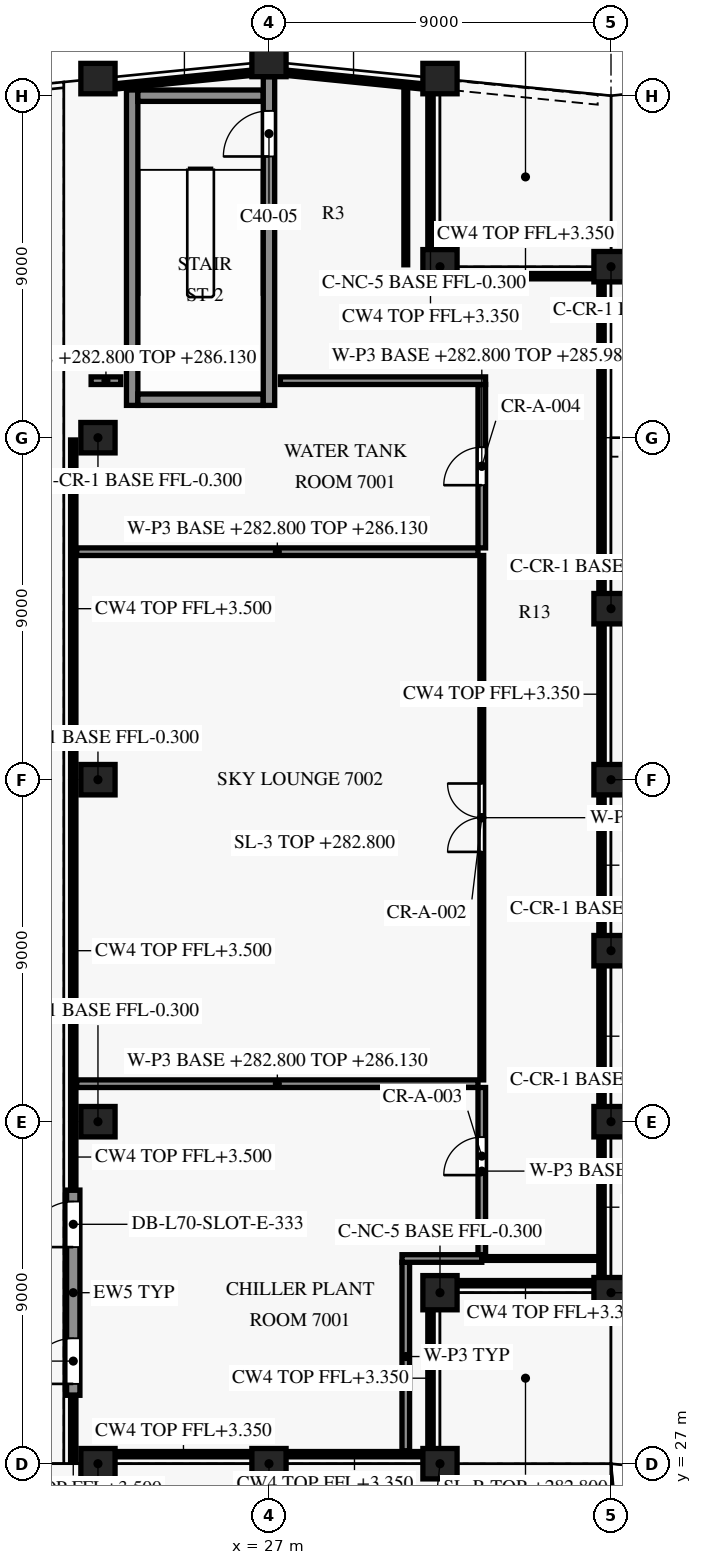
"""IFC4 building model, lengths in metres.
Left out: names, types, materials, properties, quantities, classifications, styles, units other than length and angle.
Written with IfcOpenShell. Run it as: python <this file> out.ifc"""

import sys

from ifc_helpers import new_model, si_unit, direction, frame, frame_2d, origin, origin_2d, place, context, subcontext, project, spatial, polyline, rectangle, outline, extrude, element, fill, save


model = new_model("IFC4")
c1 = context("Model", 3, precision=1e-05, world=origin(), true_north=direction((0.0, 1.0)))
c2 = subcontext(c1, "Body", "Model", "MODEL_VIEW")
j1 = project(units=[si_unit("LENGTHUNIT", "METRE"), si_unit("PLANEANGLEUNIT", "RADIAN")], contexts=[c1])
p1 = place(None, origin())
s1 = spatial("IfcSite", under=j1, at=p1, CompositionType="ELEMENT")
p2 = place(p1, origin())
s2 = spatial("IfcBuilding", under=s1, at=p2, CompositionType="ELEMENT")
p3 = place(p2, frame((0.0, 0.0, 282.8)))
s3 = spatial("IfcBuildingStorey", under=s2, at=p3, CompositionType="ELEMENT", Elevation=282.8)
for number, where, z_axis, x_axis in (
    (1, (36.0, 31.5, -0.3), (0.0, 0.0, 1.0), (0.0, 1.0, 0.0)),
    (2, (36.0, 36.0, -0.3), (0.0, 0.0, 1.0), (0.0, 1.0, 0.0)),
    (3, (36.0, 40.5, -0.3), (0.0, 0.0, 1.0), (0.0, 1.0, 0.0)),
    (4, (36.0, 45.0, -0.3), (0.0, 0.0, 1.0), (0.0, 1.0, 0.0)),
    (5, (36.0, 49.5, -0.3), (0.0, 0.0, 1.0), (0.0, 1.0, 0.0)),
    (6, (36.0, 58.5, -0.3), (0.0, 0.0, 1.0), (0.0, 1.0, 0.0)),
):
    element("IfcColumn", number, at=place(p3, frame(where, z_axis=z_axis, x_axis=x_axis)), inside=s3, PredefinedType="COLUMN", context=c2, shape_type="SweptSolid", body=[
        extrude(rectangle(XDim=0.9, YDim=0.8, at=origin_2d()), origin(), (0.0, 0.0, 1.0), 4.3),
    ])
for number, where, z_axis, x_axis in (
    (7, (31.5, 63.45, 0.0), (0.0, 0.0, 1.0), (-0.995, 0.1, 0.0)),
    (8, (27.0, 63.9, 0.0), (0.0, 0.0, 1.0), (-1.0, 0.0, 0.0)),
    (9, (22.5, 63.45, 0.0), (0.0, 0.0, 1.0), (-0.995, -0.1, 0.0)),
):
    element("IfcColumn", number, at=place(p3, frame(where, z_axis=z_axis, x_axis=x_axis)), inside=s3, PredefinedType="COLUMN", context=c2, shape_type="SweptSolid", body=[
        extrude(rectangle(XDim=0.9, YDim=0.8, at=origin_2d()), origin(), (0.0, 0.0, 1.0), 4.0),
    ])
for number, where, z_axis, x_axis in (
    (10, (22.5, 54.0, -0.3), (0.0, 0.0, 1.0), (1.0, 0.0, 0.0)),
    (11, (22.5, 45.0, -0.3), (0.0, 0.0, 1.0), (1.0, 0.0, 0.0)),
    (12, (22.5, 36.0, -0.3), (0.0, 0.0, 1.0), (1.0, 0.0, 0.0)),
):
    element("IfcColumn", number, at=place(p3, frame(where, z_axis=z_axis, x_axis=x_axis)), inside=s3, PredefinedType="COLUMN", context=c2, shape_type="SweptSolid", body=[
        extrude(rectangle(XDim=0.9, YDim=0.8, at=origin_2d()), origin(), (0.0, 0.0, 1.0), 4.3),
    ])
for number, where, z_axis, x_axis in (
    (13, (31.5, 31.5, -0.3), (0.0, 0.0, 1.0), (1.0, 0.0, 0.0)),
    (14, (31.5, 58.5, -0.3), (0.0, 0.0, 1.0), (1.0, 0.0, 0.0)),
):
    element("IfcColumn", number, at=place(p3, frame(where, z_axis=z_axis, x_axis=x_axis)), inside=s3, PredefinedType="COLUMN", context=c2, shape_type="SweptSolid", body=[
        extrude(rectangle(XDim=0.9, YDim=0.9, at=origin_2d()), origin(), (0.0, 0.0, 1.0), 4.3),
    ])
for number, where, z_axis, x_axis in (
    (15, (22.5, 27.0, -0.3), (0.0, 0.0, 1.0), (1.0, 0.0, 0.0)),
    (16, (27.0, 27.0, -0.3), (0.0, 0.0, 1.0), (1.0, 0.0, 0.0)),
    (17, (31.5, 27.0, -0.3), (0.0, 0.0, 1.0), (1.0, 0.0, 0.0)),
):
    element("IfcColumn", number, at=place(p3, frame(where, z_axis=z_axis, x_axis=x_axis)), inside=s3, PredefinedType="COLUMN", context=c2, shape_type="SweptSolid", body=[
        extrude(rectangle(XDim=0.9, YDim=0.8, at=origin_2d()), origin(), (0.0, 0.0, 1.0), 4.3),
    ])
p4 = place(p3, frame((21.85, 28.8, 0.0), z_axis=(0.0, 0.0, 1.0), x_axis=(0.0, 1.0, 0.0)))
e18 = element("IfcWall", 18, at=p4, inside=s3, PredefinedType="SOLIDWALL", context=c2, shape_type="SweptSolid", body=[
    extrude(rectangle(XDim=5.4, YDim=0.35, at=frame_2d((2.7, 0.0))), origin(), (0.0, 0.0, 1.0), 3.5),
])
p5 = place(p4, frame((0.3, 0.0, 0.0)))
e19 = element("IfcOpeningElement", 19, at=p5, cuts=e18, PredefinedType="OPENING", context=c2, shape_type="SweptSolid", body=[
    extrude(rectangle(XDim=1.2, YDim=2.5, at=frame_2d((0.6, 1.25))), frame((0.0, 0.185, 0.0), z_axis=(0.0, -1.0, 0.0), x_axis=(1.0, 0.0, 0.0)), (0.0, 0.0, 1.0), 0.37),
])
p6 = place(p4, frame((3.9, 0.0, 0.0)))
e20 = element("IfcOpeningElement", 20, at=p6, cuts=e18, PredefinedType="OPENING", context=c2, shape_type="SweptSolid", body=[
    extrude(rectangle(XDim=1.2, YDim=2.5, at=frame_2d((0.6, 1.25))), frame((0.0, 0.185, 0.0), z_axis=(0.0, -1.0, 0.0), x_axis=(1.0, 0.0, 0.0)), (0.0, 0.0, 1.0), 0.37),
])
p7 = place(p3, origin())
e21 = element("IfcWall", 21, at=p7, inside=s3, PredefinedType="PARAPET", context=c2, shape_type="SweptSolid", body=[
    extrude(outline(polyline([(36.05, 53.75), (44.05, 53.75), (44.05, 53.95), (36.05, 53.95), (36.05, 53.75)])), origin(), (0.0, 0.0, 1.0), 1.1),
])
p8 = place(p3, origin())
e22 = element("IfcWall", 22, at=p8, inside=s3, PredefinedType="PARAPET", context=c2, shape_type="SweptSolid", body=[
    extrude(outline(polyline([(44.15, 57.85), (36.05, 57.85), (36.05, 57.65), (43.95, 57.65), (43.95, 53.85), (44.15, 53.85), (44.15, 57.85)])), origin(), (0.0, 0.0, 1.0), 1.1),
])
p9 = place(p3, origin())
e23 = element("IfcWall", 23, at=p9, inside=s3, PredefinedType="PARAPET", context=c2, shape_type="SweptSolid", body=[
    extrude(outline(polyline([(4.52, 18.02), (31.48, 18.02), (31.48, 22.52), (35.65, 22.52), (35.65, 22.77), (31.23, 22.77), (31.23, 18.27), (4.77, 18.27), (4.77, 22.77), (-0.152, 22.77), (0.236, 26.65), (-0.015, 26.65), (-0.428, 22.52), (4.52, 22.52), (4.52, 18.02)])), origin(), (0.0, 0.0, 1.0), 1.4),
])
p10 = place(p3, origin())
e24 = element("IfcWall", 24, at=p10, inside=s3, PredefinedType="PARAPET", context=c2, shape_type="SweptSolid", body=[
    extrude(outline(polyline([(35.65, 63.015), (31.85, 63.395), (31.85, 63.144), (35.65, 62.764), (35.65, 63.015)])), origin(), (0.0, 0.0, 1.0), 1.4),
])
for number, where, z_axis, x_axis in (
    (25, (23.55, 55.0, 0.0), (0.0, 0.0, 1.0), (1.0, 0.0, 0.0)),
    (26, (23.55, 63.0, 0.0), (0.0, 0.0, 1.0), (1.0, 0.0, 0.0)),
):
    element("IfcWall", number, at=place(p3, frame(where, z_axis=z_axis, x_axis=x_axis)), inside=s3, PredefinedType="SHEAR", context=c2, shape_type="SweptSolid", body=[
        extrude(rectangle(XDim=3.3, YDim=0.3, at=frame_2d((1.65, 0.0))), origin(), (0.0, 0.0, 1.0), 3.7),
    ])
p11 = place(p3, frame((23.4, 54.85, 0.0), z_axis=(0.0, 0.0, 1.0), x_axis=(0.0, 1.0, 0.0)))
e27 = element("IfcWall", 27, at=p11, inside=s3, PredefinedType="SHEAR", context=c2, shape_type="SweptSolid", body=[
    extrude(rectangle(XDim=8.3, YDim=0.3, at=frame_2d((4.15, 0.0))), origin(), (0.0, 0.0, 1.0), 3.7),
])
p12 = place(p3, frame((27.0, 54.85, 0.0), z_axis=(0.0, 0.0, 1.0), x_axis=(0.0, 1.0, 0.0)))
e28 = element("IfcWall", 28, at=p12, inside=s3, PredefinedType="SHEAR", context=c2, shape_type="SweptSolid", body=[
    extrude(rectangle(XDim=8.65, YDim=0.3, at=frame_2d((4.325, 0.0))), origin(), (0.0, 0.0, 1.0), 3.7),
])
p13 = place(p12, frame((6.55, 0.0, 0.0)))
e29 = element("IfcOpeningElement", 29, at=p13, cuts=e28, PredefinedType="OPENING", context=c2, shape_type="SweptSolid", body=[
    extrude(rectangle(XDim=1.2, YDim=2.2, at=frame_2d((0.6, 1.1))), frame((0.0, 0.16, 0.0), z_axis=(0.0, -1.0, 0.0), x_axis=(1.0, 0.0, 0.0)), (0.0, 0.0, 1.0), 0.32),
])
p14 = place(p3, frame((30.6, 32.3, 0.0), z_axis=(0.0, 0.0, 1.0), x_axis=(0.0, -1.0, 0.0)))
e30 = element("IfcWall", 30, at=p14, inside=s3, PredefinedType="PARTITIONING", context=c2, shape_type="SweptSolid", body=[
    extrude(rectangle(XDim=4.96, YDim=0.2, at=frame_2d((2.48, 0.0))), origin(), (0.0, 0.0, 1.0), 3.68),
])
p15 = place(p3, frame((32.6, 32.4, 0.0), z_axis=(0.0, 0.0, 1.0), x_axis=(-1.0, 0.0, 0.0)))
e31 = element("IfcWall", 31, at=p15, inside=s3, PredefinedType="PARTITIONING", context=c2, shape_type="SweptSolid", body=[
    extrude(rectangle(XDim=2.1, YDim=0.2, at=frame_2d((1.05, 0.0))), origin(), (0.0, 0.0, 1.0), 3.68),
])
p16 = place(p3, frame((35.66, 32.4, 0.0), z_axis=(0.0, 0.0, 1.0), x_axis=(-1.0, 0.0, 0.0)))
e32 = element("IfcWall", 32, at=p16, inside=s3, PredefinedType="PARTITIONING", context=c2, shape_type="SweptSolid", body=[
    extrude(rectangle(XDim=3.06, YDim=0.1, at=frame_2d((1.53, 0.0))), origin(), (0.0, 0.0, 1.0), 3.68),
])
p17 = place(p3, frame((32.6, 32.5, 0.0), z_axis=(0.0, 0.0, 1.0), x_axis=(0.0, 1.0, 0.0)))
e33 = element("IfcWall", 33, at=p17, inside=s3, PredefinedType="PARTITIONING", context=c2, shape_type="SweptSolid", body=[
    extrude(rectangle(XDim=4.4, YDim=0.2, at=frame_2d((2.2, 0.0))), origin(), (0.0, 0.0, 1.0), 3.18),
])
p18 = place(p17, frame((2.094, 0.0, 0.0)))
e34 = element("IfcOpeningElement", 34, at=p18, cuts=e33, PredefinedType="OPENING", context=c2, shape_type="SweptSolid", body=[
    extrude(rectangle(XDim=1.0, YDim=2.1, at=frame_2d((0.5, 1.05))), frame((0.0, 0.11, 0.0), z_axis=(0.0, -1.0, 0.0), x_axis=(1.0, 0.0, 0.0)), (0.0, 0.0, 1.0), 0.22),
])
p19 = place(p3, frame((32.5, 37.0, 0.0), z_axis=(0.0, 0.0, 1.0), x_axis=(-1.0, 0.0, 0.0)))
e35 = element("IfcWall", 35, at=p19, inside=s3, PredefinedType="PARTITIONING", context=c2, shape_type="SweptSolid", body=[
    extrude(rectangle(XDim=10.56, YDim=0.2, at=frame_2d((5.28, 0.0))), origin(), (0.0, 0.0, 1.0), 3.33),
])
p20 = place(p3, frame((32.6, 37.1, 0.0), z_axis=(0.0, 0.0, 1.0), x_axis=(0.0, 1.0, 0.0)))
e36 = element("IfcWall", 36, at=p20, inside=s3, PredefinedType="PARTITIONING", context=c2, shape_type="SweptSolid", body=[
    extrude(rectangle(XDim=13.8, YDim=0.1, at=frame_2d((6.9, 0.0))), origin(), (0.0, 0.0, 1.0), 3.18),
])
p21 = place(p20, frame((6.0, 0.0, 0.0)))
e37 = element("IfcOpeningElement", 37, at=p21, cuts=e36, PredefinedType="OPENING", context=c2, shape_type="SweptSolid", body=[
    extrude(rectangle(XDim=1.8, YDim=2.1, at=frame_2d((0.9, 1.05))), frame((0.0, 0.06, 0.0), z_axis=(0.0, -1.0, 0.0), x_axis=(1.0, 0.0, 0.0)), (0.0, 0.0, 1.0), 0.12),
])
p22 = place(p3, frame((21.94, 51.0, 0.0), z_axis=(0.0, 0.0, 1.0), x_axis=(1.0, 0.0, 0.0)))
e38 = element("IfcWall", 38, at=p22, inside=s3, PredefinedType="PARTITIONING", context=c2, shape_type="SweptSolid", body=[
    extrude(rectangle(XDim=10.56, YDim=0.2, at=frame_2d((5.28, 0.0))), origin(), (0.0, 0.0, 1.0), 3.33),
])
p23 = place(p3, frame((32.6, 51.1, 0.0), z_axis=(0.0, 0.0, 1.0), x_axis=(0.0, 1.0, 0.0)))
e39 = element("IfcWall", 39, at=p23, inside=s3, PredefinedType="PARTITIONING", context=c2, shape_type="SweptSolid", body=[
    extrude(rectangle(XDim=4.3, YDim=0.2, at=frame_2d((2.15, 0.0))), origin(), (0.0, 0.0, 1.0), 3.18),
])
p24 = place(p23, frame((1.65, 0.0, 0.0)))
e40 = element("IfcOpeningElement", 40, at=p24, cuts=e39, PredefinedType="OPENING", context=c2, shape_type="SweptSolid", body=[
    extrude(rectangle(XDim=1.0, YDim=2.1, at=frame_2d((0.5, 1.05))), frame((0.0, 0.11, 0.0), z_axis=(0.0, -1.0, 0.0), x_axis=(1.0, 0.0, 0.0)), (0.0, 0.0, 1.0), 0.22),
])
p25 = place(p3, frame((22.32, 55.5, 0.0), z_axis=(0.0, 0.0, 1.0), x_axis=(1.0, 0.0, 0.0)))
e41 = element("IfcWall", 41, at=p25, inside=s3, PredefinedType="PARTITIONING", context=c2, shape_type="SweptSolid", body=[
    extrude(rectangle(XDim=0.78, YDim=0.2, at=frame_2d((0.39, 0.0))), origin(), (0.0, 0.0, 1.0), 3.33),
])
p26 = place(p3, frame((32.7, 55.5, 0.0), z_axis=(0.0, 0.0, 1.0), x_axis=(-1.0, 0.0, 0.0)))
e42 = element("IfcWall", 42, at=p26, inside=s3, PredefinedType="PARTITIONING", context=c2, shape_type="SweptSolid", body=[
    extrude(rectangle(XDim=5.4, YDim=0.2, at=frame_2d((2.7, 0.0))), origin(), (0.0, 0.0, 1.0), 3.68),
])
p27 = place(p3, frame((30.6, 63.198, 0.0), z_axis=(0.0, 0.0, 1.0), x_axis=(0.0, -1.0, 0.0)))
e43 = element("IfcWall", 43, at=p27, inside=s3, PredefinedType="PARTITIONING", context=c2, shape_type="SweptSolid", body=[
    extrude(rectangle(XDim=4.648, YDim=0.1, at=frame_2d((2.324, 0.0))), origin(), (0.0, 0.0, 1.0), 3.68),
])
p28 = place(p5, origin())
e44 = element("IfcDoor", 44, at=p28, inside=s3, OperationType="SINGLE_SWING_RIGHT", PredefinedType="DOOR", context=c2, shape_type="SweptSolid", body=[
    extrude(rectangle(XDim=1.2, YDim=2.5, at=frame_2d((0.6, 1.25))), frame((0.0, 0.025, 0.0), z_axis=(0.0, -1.0, 0.0), x_axis=(1.0, 0.0, 0.0)), (0.0, 0.0, 1.0), 0.05),
])
fill(e19, e44)
p29 = place(p6, origin())
e45 = element("IfcDoor", 45, at=p29, inside=s3, OperationType="SINGLE_SWING_RIGHT", PredefinedType="DOOR", context=c2, shape_type="SweptSolid", body=[
    extrude(rectangle(XDim=1.2, YDim=2.5, at=frame_2d((0.6, 1.25))), frame((0.0, 0.025, 0.0), z_axis=(0.0, -1.0, 0.0), x_axis=(1.0, 0.0, 0.0)), (0.0, 0.0, 1.0), 0.05),
])
fill(e20, e45)
p30 = place(p13, origin())
e46 = element("IfcDoor", 46, at=p30, inside=s3, OperationType="SINGLE_SWING_LEFT", PredefinedType="DOOR", context=c2, shape_type="SweptSolid", body=[
    extrude(rectangle(XDim=1.2, YDim=2.2, at=frame_2d((0.6, 1.1))), frame((0.0, 0.025, 0.0), z_axis=(0.0, -1.0, 0.0), x_axis=(1.0, 0.0, 0.0)), (0.0, 0.0, 1.0), 0.05),
])
fill(e29, e46)
p31 = place(p21, origin())
e47 = element("IfcDoor", 47, at=p31, inside=s3, OperationType="DOUBLE_DOOR_SINGLE_SWING", PredefinedType="DOOR", context=c2, shape_type="SweptSolid", body=[
    extrude(rectangle(XDim=1.8, YDim=2.1, at=frame_2d((0.9, 1.05))), frame((0.0, 0.025, 0.0), z_axis=(0.0, -1.0, 0.0), x_axis=(1.0, 0.0, 0.0)), (0.0, 0.0, 1.0), 0.05),
])
fill(e37, e47)
p32 = place(p18, origin())
e48 = element("IfcDoor", 48, at=p32, inside=s3, OperationType="SINGLE_SWING_RIGHT", PredefinedType="DOOR", context=c2, shape_type="SweptSolid", body=[
    extrude(rectangle(XDim=1.0, YDim=2.1, at=frame_2d((0.5, 1.05))), frame((0.0, 0.025, 0.0), z_axis=(0.0, -1.0, 0.0), x_axis=(1.0, 0.0, 0.0)), (0.0, 0.0, 1.0), 0.05),
])
fill(e34, e48)
p33 = place(p24, origin())
e49 = element("IfcDoor", 49, at=p33, inside=s3, OperationType="SINGLE_SWING_RIGHT", PredefinedType="DOOR", context=c2, shape_type="SweptSolid", body=[
    extrude(rectangle(XDim=1.0, YDim=2.1, at=frame_2d((0.5, 1.05))), frame((0.0, 0.025, 0.0), z_axis=(0.0, -1.0, 0.0), x_axis=(1.0, 0.0, 0.0)), (0.0, 0.0, 1.0), 0.05),
])
fill(e40, e49)
save(model, sys.argv[1])
